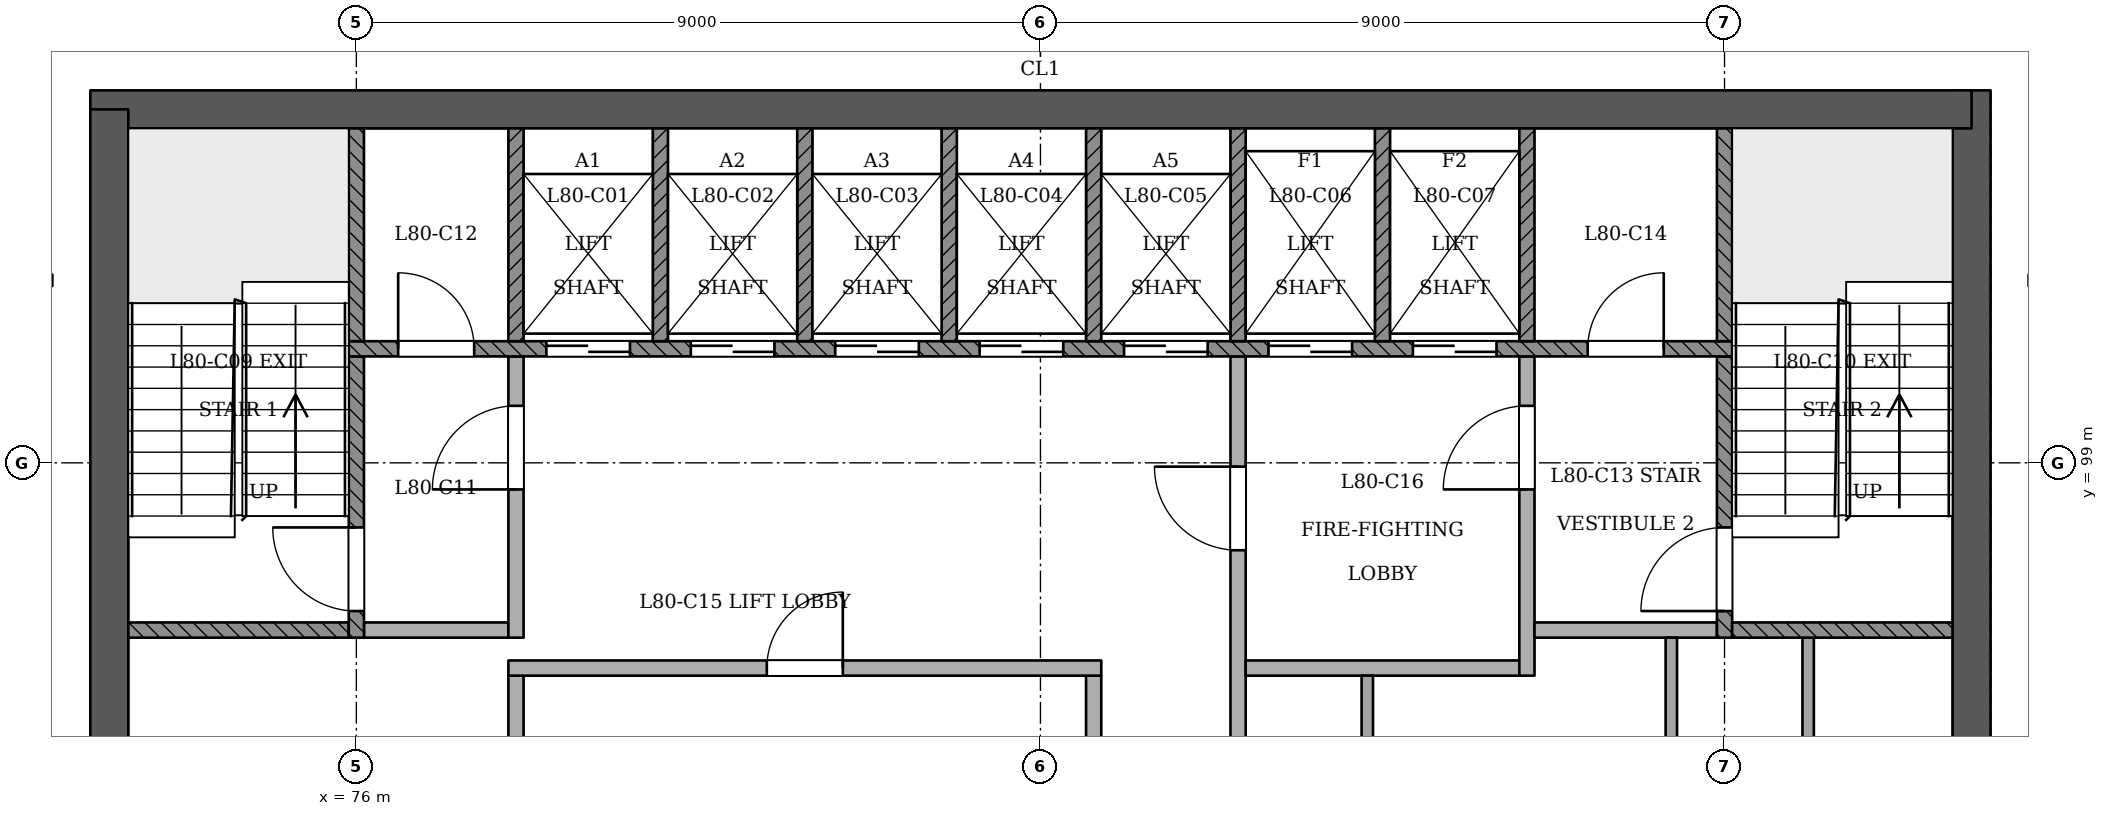
"""IFC4 building model, lengths in metres.
Left out: names, types, materials, properties, quantities, classifications, styles, units other than length and angle.
Written with IfcOpenShell. Run it as: python <this file> out.ifc"""

import sys

from ifc_helpers import new_model, si_unit, direction, frame, frame_2d, origin, place, context, subcontext, project, spatial, rectangle, extrude, element, fill, save


model = new_model("IFC4")
c1 = context("Model", 3, precision=1e-05, world=origin(), true_north=direction((0.0, 1.0)))
c2 = subcontext(c1, "Body", "Model", "MODEL_VIEW")
j1 = project(units=[si_unit("LENGTHUNIT", "METRE"), si_unit("PLANEANGLEUNIT", "RADIAN")], contexts=[c1])
p1 = place(None, origin())
s1 = spatial("IfcSite", under=j1, at=p1, CompositionType="ELEMENT")
p2 = place(p1, origin())
s2 = spatial("IfcBuilding", under=s1, at=p2, CompositionType="ELEMENT")
p3 = place(p2, frame((0.0, 0.0, 309.4)))
s3 = spatial("IfcBuildingStorey", under=s2, at=p3, CompositionType="ELEMENT", Elevation=309.4)
p4 = place(p3, frame((97.25, 93.15, 0.0), z_axis=(0.0, 0.0, 1.0), x_axis=(0.0, 1.0, 0.0)))
e1 = element("IfcWall", 1, at=p4, inside=s3, PredefinedType="SHEAR", context=c2, shape_type="SweptSolid", body=[
    extrude(rectangle(XDim=10.75, YDim=0.5, at=frame_2d((5.375, 0.0))), origin(), (0.0, 0.0, 1.0), 3.6),
])
p5 = place(p3, frame((97.25, 103.65, 0.0), z_axis=(0.0, 0.0, 1.0), x_axis=(-1.0, 0.0, 0.0)))
e2 = element("IfcWall", 2, at=p5, inside=s3, PredefinedType="SHEAR", context=c2, shape_type="SweptSolid", body=[
    extrude(rectangle(XDim=24.75, YDim=0.5, at=frame_2d((12.375, 0.0))), origin(), (0.0, 0.0, 1.0), 3.6),
])
p6 = place(p3, frame((72.75, 103.65, 0.0), z_axis=(0.0, 0.0, 1.0), x_axis=(0.0, -1.0, 0.0)))
e3 = element("IfcWall", 3, at=p6, inside=s3, PredefinedType="SHEAR", context=c2, shape_type="SweptSolid", body=[
    extrude(rectangle(XDim=10.75, YDim=0.5, at=frame_2d((5.375, 0.0))), origin(), (0.0, 0.0, 1.0), 3.6),
])
for number, where, z_axis, x_axis in (
    (4, (78.1, 93.4, 0.0), (0.0, 0.0, 1.0), (0.0, 1.0, 0.0)),
    (5, (85.7, 93.4, 0.0), (0.0, 0.0, 1.0), (0.0, 1.0, 0.0)),
):
    element("IfcWall", number, at=place(p3, frame(where, z_axis=z_axis, x_axis=x_axis)), inside=s3, PredefinedType="PARTITIONING", context=c2, shape_type="SweptSolid", body=[
        extrude(rectangle(XDim=2.8, YDim=0.2, at=frame_2d((1.4, 0.0))), origin(), (0.0, 0.0, 1.0), 3.2),
    ])
p7 = place(p3, frame((87.6, 93.4, 0.0), z_axis=(0.0, 0.0, 1.0), x_axis=(0.0, 1.0, 0.0)))
e6 = element("IfcWall", 6, at=p7, inside=s3, PredefinedType="PARTITIONING", context=c2, shape_type="SweptSolid", body=[
    extrude(rectangle(XDim=7.0, YDim=0.2, at=frame_2d((3.5, 0.0))), origin(), (0.0, 0.0, 1.0), 3.2),
])
p8 = place(p7, frame((4.45, 0.0, 0.0)))
e7 = element("IfcOpeningElement", 7, at=p8, cuts=e6, PredefinedType="OPENING", context=c2, shape_type="SweptSolid", body=[
    extrude(rectangle(XDim=1.1, YDim=2.1, at=frame_2d((0.55, 1.05))), frame((0.0, 0.11, 0.0), z_axis=(0.0, -1.0, 0.0), x_axis=(1.0, 0.0, 0.0)), (0.0, 0.0, 1.0), 0.221),
])
p9 = place(p3, frame((89.3, 93.4, 0.0), z_axis=(0.0, 0.0, 1.0), x_axis=(0.0, 1.0, 0.0)))
e8 = element("IfcWall", 8, at=p9, inside=s3, PredefinedType="PARTITIONING", context=c2, shape_type="SweptSolid", body=[
    extrude(rectangle(XDim=2.8, YDim=0.15, at=frame_2d((1.4, 0.0))), origin(), (0.0, 0.0, 1.0), 3.2),
])
for number, where, z_axis, x_axis in (
    (9, (93.3, 93.4, 0.0), (0.0, 0.0, 1.0), (0.0, 1.0, 0.0)),
    (10, (95.1, 93.4, 0.0), (0.0, 0.0, 1.0), (0.0, 1.0, 0.0)),
):
    element("IfcWall", number, at=place(p3, frame(where, z_axis=z_axis, x_axis=x_axis)), inside=s3, PredefinedType="PARTITIONING", context=c2, shape_type="SweptSolid", body=[
        extrude(rectangle(XDim=3.3, YDim=0.15, at=frame_2d((1.65, 0.0))), origin(), (0.0, 0.0, 1.0), 3.2),
    ])
p10 = place(p3, frame((78.0, 96.3, 0.0), z_axis=(0.0, 0.0, 1.0), x_axis=(1.0, 0.0, 0.0)))
e11 = element("IfcWall", 11, at=p10, inside=s3, PredefinedType="PARTITIONING", context=c2, shape_type="SweptSolid", body=[
    extrude(rectangle(XDim=7.8, YDim=0.2, at=frame_2d((3.9, 0.0))), origin(), (0.0, 0.0, 1.0), 3.2),
])
p11 = place(p10, frame((3.4, 0.0, 0.0)))
e12 = element("IfcOpeningElement", 12, at=p11, cuts=e11, PredefinedType="OPENING", context=c2, shape_type="SweptSolid", body=[
    extrude(rectangle(XDim=1.0, YDim=2.1, at=frame_2d((0.5, 1.05))), frame((0.0, 0.11, 0.0), z_axis=(0.0, -1.0, 0.0), x_axis=(1.0, 0.0, 0.0)), (0.0, 0.0, 1.0), 0.221),
])
p12 = place(p3, frame((87.7, 96.3, 0.0), z_axis=(0.0, 0.0, 1.0), x_axis=(1.0, 0.0, 0.0)))
e13 = element("IfcWall", 13, at=p12, inside=s3, PredefinedType="PARTITIONING", context=c2, shape_type="SweptSolid", body=[
    extrude(rectangle(XDim=3.6, YDim=0.2, at=frame_2d((1.8, 0.0))), origin(), (0.0, 0.0, 1.0), 3.2),
])
p13 = place(p3, frame((91.4, 96.2, 0.0), z_axis=(0.0, 0.0, 1.0), x_axis=(0.0, 1.0, 0.0)))
e14 = element("IfcWall", 14, at=p13, inside=s3, PredefinedType="PARTITIONING", context=c2, shape_type="SweptSolid", body=[
    extrude(rectangle(XDim=4.2, YDim=0.2, at=frame_2d((2.1, 0.0))), origin(), (0.0, 0.0, 1.0), 3.2),
])
p14 = place(p13, frame((2.45, 0.0, 0.0)))
e15 = element("IfcOpeningElement", 15, at=p14, cuts=e14, PredefinedType="OPENING", context=c2, shape_type="SweptSolid", body=[
    extrude(rectangle(XDim=1.1, YDim=2.1, at=frame_2d((0.55, 1.05))), frame((0.0, 0.11, 0.0), z_axis=(0.0, -1.0, 0.0), x_axis=(1.0, 0.0, 0.0)), (0.0, 0.0, 1.0), 0.221),
])
p15 = place(p3, frame((73.0, 96.8, 0.0), z_axis=(0.0, 0.0, 1.0), x_axis=(1.0, 0.0, 0.0)))
e16 = element("IfcWall", 16, at=p15, inside=s3, PredefinedType="SOLIDWALL", context=c2, shape_type="SweptSolid", body=[
    extrude(rectangle(XDim=2.9, YDim=0.2, at=frame_2d((1.45, 0.0))), origin(), (0.0, 0.0, 1.0), 3.2),
])
p16 = place(p3, frame((76.0, 96.7, 0.0), z_axis=(0.0, 0.0, 1.0), x_axis=(0.0, 1.0, 0.0)))
e17 = element("IfcWall", 17, at=p16, inside=s3, PredefinedType="SOLIDWALL", context=c2, shape_type="SweptSolid", body=[
    extrude(rectangle(XDim=3.7, YDim=0.2, at=frame_2d((1.85, 0.0))), origin(), (0.0, 0.0, 1.0), 3.2),
])
p17 = place(p16, frame((0.35, 0.0, 0.0)))
e18 = element("IfcOpeningElement", 18, at=p17, cuts=e17, PredefinedType="OPENING", context=c2, shape_type="SweptSolid", body=[
    extrude(rectangle(XDim=1.1, YDim=2.1, at=frame_2d((0.55, 1.05))), frame((0.0, 0.11, 0.0), z_axis=(0.0, -1.0, 0.0), x_axis=(1.0, 0.0, 0.0)), (0.0, 0.0, 1.0), 0.221),
])
p18 = place(p3, frame((76.1, 96.8, 0.0), z_axis=(0.0, 0.0, 1.0), x_axis=(1.0, 0.0, 0.0)))
e19 = element("IfcWall", 19, at=p18, inside=s3, PredefinedType="PARTITIONING", context=c2, shape_type="SweptSolid", body=[
    extrude(rectangle(XDim=1.9, YDim=0.2, at=frame_2d((0.95, 0.0))), origin(), (0.0, 0.0, 1.0), 3.2),
])
p19 = place(p3, frame((78.1, 96.7, 0.0), z_axis=(0.0, 0.0, 1.0), x_axis=(0.0, 1.0, 0.0)))
e20 = element("IfcWall", 20, at=p19, inside=s3, PredefinedType="PARTITIONING", context=c2, shape_type="SweptSolid", body=[
    extrude(rectangle(XDim=3.7, YDim=0.2, at=frame_2d((1.85, 0.0))), origin(), (0.0, 0.0, 1.0), 3.2),
])
p20 = place(p19, frame((1.95, 0.0, 0.0)))
e21 = element("IfcOpeningElement", 21, at=p20, cuts=e20, PredefinedType="OPENING", context=c2, shape_type="SweptSolid", body=[
    extrude(rectangle(XDim=1.1, YDim=2.1, at=frame_2d((0.55, 1.05))), frame((0.0, 0.11, 0.0), z_axis=(0.0, -1.0, 0.0), x_axis=(1.0, 0.0, 0.0)), (0.0, 0.0, 1.0), 0.221),
])
p21 = place(p3, frame((91.5, 96.8, 0.0), z_axis=(0.0, 0.0, 1.0), x_axis=(1.0, 0.0, 0.0)))
e22 = element("IfcWall", 22, at=p21, inside=s3, PredefinedType="PARTITIONING", context=c2, shape_type="SweptSolid", body=[
    extrude(rectangle(XDim=2.4, YDim=0.2, at=frame_2d((1.2, 0.0))), origin(), (0.0, 0.0, 1.0), 3.2),
])
p22 = place(p3, frame((94.0, 96.7, 0.0), z_axis=(0.0, 0.0, 1.0), x_axis=(0.0, 1.0, 0.0)))
e23 = element("IfcWall", 23, at=p22, inside=s3, PredefinedType="SOLIDWALL", context=c2, shape_type="SweptSolid", body=[
    extrude(rectangle(XDim=3.7, YDim=0.2, at=frame_2d((1.85, 0.0))), origin(), (0.0, 0.0, 1.0), 3.2),
])
p23 = place(p22, frame((0.35, 0.0, 0.0)))
e24 = element("IfcOpeningElement", 24, at=p23, cuts=e23, PredefinedType="OPENING", context=c2, shape_type="SweptSolid", body=[
    extrude(rectangle(XDim=1.1, YDim=2.1, at=frame_2d((0.55, 1.05))), frame((0.0, 0.11, 0.0), z_axis=(0.0, -1.0, 0.0), x_axis=(1.0, 0.0, 0.0)), (0.0, 0.0, 1.0), 0.221),
])
p24 = place(p3, frame((94.1, 96.8, 0.0), z_axis=(0.0, 0.0, 1.0), x_axis=(1.0, 0.0, 0.0)))
e25 = element("IfcWall", 25, at=p24, inside=s3, PredefinedType="SOLIDWALL", context=c2, shape_type="SweptSolid", body=[
    extrude(rectangle(XDim=2.9, YDim=0.2, at=frame_2d((1.45, 0.0))), origin(), (0.0, 0.0, 1.0), 3.2),
])
p25 = place(p3, frame((75.9, 100.5, 0.0), z_axis=(0.0, 0.0, 1.0), x_axis=(1.0, 0.0, 0.0)))
e26 = element("IfcWall", 26, at=p25, inside=s3, PredefinedType="SOLIDWALL", context=c2, shape_type="SweptSolid", body=[
    extrude(rectangle(XDim=18.2, YDim=0.2, at=frame_2d((9.1, 0.0))), origin(), (0.0, 0.0, 1.0), 3.2),
])
p26 = place(p25, frame((2.6, 0.0, 0.0)))
e27 = element("IfcOpeningElement", 27, at=p26, cuts=e26, PredefinedType="OPENING", context=c2, shape_type="SweptSolid", body=[
    extrude(rectangle(XDim=1.1, YDim=2.1, at=frame_2d((0.55, 1.05))), frame((0.0, 0.11, 0.0), z_axis=(0.0, -1.0, 0.0), x_axis=(1.0, 0.0, 0.0)), (0.0, 0.0, 1.0), 0.221),
])
p27 = place(p25, frame((4.5, 0.0, 0.0)))
e28 = element("IfcOpeningElement", 28, at=p27, cuts=e26, PredefinedType="OPENING", context=c2, shape_type="SweptSolid", body=[
    extrude(rectangle(XDim=1.1, YDim=2.1, at=frame_2d((0.55, 1.05))), frame((0.0, 0.11, 0.0), z_axis=(0.0, -1.0, 0.0), x_axis=(1.0, 0.0, 0.0)), (0.0, 0.0, 1.0), 0.221),
])
p28 = place(p25, frame((6.4, 0.0, 0.0)))
e29 = element("IfcOpeningElement", 29, at=p28, cuts=e26, PredefinedType="OPENING", context=c2, shape_type="SweptSolid", body=[
    extrude(rectangle(XDim=1.1, YDim=2.1, at=frame_2d((0.55, 1.05))), frame((0.0, 0.11, 0.0), z_axis=(0.0, -1.0, 0.0), x_axis=(1.0, 0.0, 0.0)), (0.0, 0.0, 1.0), 0.221),
])
p29 = place(p25, frame((8.3, 0.0, 0.0)))
e30 = element("IfcOpeningElement", 30, at=p29, cuts=e26, PredefinedType="OPENING", context=c2, shape_type="SweptSolid", body=[
    extrude(rectangle(XDim=1.1, YDim=2.1, at=frame_2d((0.55, 1.05))), frame((0.0, 0.11, 0.0), z_axis=(0.0, -1.0, 0.0), x_axis=(1.0, 0.0, 0.0)), (0.0, 0.0, 1.0), 0.221),
])
p30 = place(p25, frame((10.2, 0.0, 0.0)))
e31 = element("IfcOpeningElement", 31, at=p30, cuts=e26, PredefinedType="OPENING", context=c2, shape_type="SweptSolid", body=[
    extrude(rectangle(XDim=1.1, YDim=2.1, at=frame_2d((0.55, 1.05))), frame((0.0, 0.11, 0.0), z_axis=(0.0, -1.0, 0.0), x_axis=(1.0, 0.0, 0.0)), (0.0, 0.0, 1.0), 0.221),
])
p31 = place(p25, frame((12.1, 0.0, 0.0)))
e32 = element("IfcOpeningElement", 32, at=p31, cuts=e26, PredefinedType="OPENING", context=c2, shape_type="SweptSolid", body=[
    extrude(rectangle(XDim=1.1, YDim=2.1, at=frame_2d((0.55, 1.05))), frame((0.0, 0.11, 0.0), z_axis=(0.0, -1.0, 0.0), x_axis=(1.0, 0.0, 0.0)), (0.0, 0.0, 1.0), 0.221),
])
p32 = place(p25, frame((14.0, 0.0, 0.0)))
e33 = element("IfcOpeningElement", 33, at=p32, cuts=e26, PredefinedType="OPENING", context=c2, shape_type="SweptSolid", body=[
    extrude(rectangle(XDim=1.1, YDim=2.1, at=frame_2d((0.55, 1.05))), frame((0.0, 0.11, 0.0), z_axis=(0.0, -1.0, 0.0), x_axis=(1.0, 0.0, 0.0)), (0.0, 0.0, 1.0), 0.221),
])
p33 = place(p25, frame((0.65, 0.0, 0.0)))
e34 = element("IfcOpeningElement", 34, at=p33, cuts=e26, PredefinedType="OPENING", context=c2, shape_type="SweptSolid", body=[
    extrude(rectangle(XDim=1.0, YDim=2.1, at=frame_2d((0.5, 1.05))), frame((0.0, 0.11, 0.0), z_axis=(0.0, -1.0, 0.0), x_axis=(1.0, 0.0, 0.0)), (0.0, 0.0, 1.0), 0.221),
])
p34 = place(p25, frame((16.3, 0.0, 0.0)))
e35 = element("IfcOpeningElement", 35, at=p34, cuts=e26, PredefinedType="OPENING", context=c2, shape_type="SweptSolid", body=[
    extrude(rectangle(XDim=1.0, YDim=2.1, at=frame_2d((0.5, 1.05))), frame((0.0, 0.11, 0.0), z_axis=(0.0, -1.0, 0.0), x_axis=(1.0, 0.0, 0.0)), (0.0, 0.0, 1.0), 0.221),
])
for number, where, z_axis, x_axis in (
    (36, (76.0, 100.6, 0.0), (0.0, 0.0, 1.0), (0.0, 1.0, 0.0)),
    (37, (78.1, 100.6, 0.0), (0.0, 0.0, 1.0), (0.0, 1.0, 0.0)),
    (38, (80.0, 100.6, 0.0), (0.0, 0.0, 1.0), (0.0, 1.0, 0.0)),
    (39, (81.9, 100.6, 0.0), (0.0, 0.0, 1.0), (0.0, 1.0, 0.0)),
    (40, (83.8, 100.6, 0.0), (0.0, 0.0, 1.0), (0.0, 1.0, 0.0)),
    (41, (85.7, 100.6, 0.0), (0.0, 0.0, 1.0), (0.0, 1.0, 0.0)),
    (42, (87.6, 100.6, 0.0), (0.0, 0.0, 1.0), (0.0, 1.0, 0.0)),
    (43, (89.5, 100.6, 0.0), (0.0, 0.0, 1.0), (0.0, 1.0, 0.0)),
    (44, (91.4, 100.6, 0.0), (0.0, 0.0, 1.0), (0.0, 1.0, 0.0)),
    (45, (94.0, 100.6, 0.0), (0.0, 0.0, 1.0), (0.0, 1.0, 0.0)),
):
    element("IfcWall", number, at=place(p3, frame(where, z_axis=z_axis, x_axis=x_axis)), inside=s3, PredefinedType="SOLIDWALL", context=c2, shape_type="SweptSolid", body=[
        extrude(rectangle(XDim=2.8, YDim=0.2, at=frame_2d((1.4, 0.0))), origin(), (0.0, 0.0, 1.0), 3.2),
    ])
p35 = place(p26, origin())
e46 = element("IfcDoor", 46, at=p35, inside=s3, OperationType="SLIDING_TO_RIGHT", PredefinedType="NOTDEFINED", context=c2, shape_type="SweptSolid", body=[
    extrude(rectangle(XDim=1.1, YDim=2.1, at=frame_2d((0.55, 1.05))), frame((0.0, 0.025, 0.0), z_axis=(0.0, -1.0, 0.0), x_axis=(1.0, 0.0, 0.0)), (0.0, 0.0, 1.0), 0.05),
])
fill(e27, e46)
p36 = place(p27, origin())
e47 = element("IfcDoor", 47, at=p36, inside=s3, OperationType="SLIDING_TO_LEFT", PredefinedType="NOTDEFINED", context=c2, shape_type="SweptSolid", body=[
    extrude(rectangle(XDim=1.1, YDim=2.1, at=frame_2d((0.55, 1.05))), frame((0.0, 0.025, 0.0), z_axis=(0.0, -1.0, 0.0), x_axis=(1.0, 0.0, 0.0)), (0.0, 0.0, 1.0), 0.05),
])
fill(e28, e47)
p37 = place(p28, origin())
e48 = element("IfcDoor", 48, at=p37, inside=s3, OperationType="SLIDING_TO_RIGHT", PredefinedType="NOTDEFINED", context=c2, shape_type="SweptSolid", body=[
    extrude(rectangle(XDim=1.1, YDim=2.1, at=frame_2d((0.55, 1.05))), frame((0.0, 0.025, 0.0), z_axis=(0.0, -1.0, 0.0), x_axis=(1.0, 0.0, 0.0)), (0.0, 0.0, 1.0), 0.05),
])
fill(e29, e48)
p38 = place(p29, origin())
e49 = element("IfcDoor", 49, at=p38, inside=s3, OperationType="SLIDING_TO_LEFT", PredefinedType="NOTDEFINED", context=c2, shape_type="SweptSolid", body=[
    extrude(rectangle(XDim=1.1, YDim=2.1, at=frame_2d((0.55, 1.05))), frame((0.0, 0.025, 0.0), z_axis=(0.0, -1.0, 0.0), x_axis=(1.0, 0.0, 0.0)), (0.0, 0.0, 1.0), 0.05),
])
fill(e30, e49)
p39 = place(p30, origin())
e50 = element("IfcDoor", 50, at=p39, inside=s3, OperationType="SLIDING_TO_RIGHT", PredefinedType="NOTDEFINED", context=c2, shape_type="SweptSolid", body=[
    extrude(rectangle(XDim=1.1, YDim=2.1, at=frame_2d((0.55, 1.05))), frame((0.0, 0.025, 0.0), z_axis=(0.0, -1.0, 0.0), x_axis=(1.0, 0.0, 0.0)), (0.0, 0.0, 1.0), 0.05),
])
fill(e31, e50)
p40 = place(p31, origin())
e51 = element("IfcDoor", 51, at=p40, inside=s3, OperationType="SLIDING_TO_RIGHT", PredefinedType="NOTDEFINED", context=c2, shape_type="SweptSolid", body=[
    extrude(rectangle(XDim=1.1, YDim=2.1, at=frame_2d((0.55, 1.05))), frame((0.0, 0.025, 0.0), z_axis=(0.0, -1.0, 0.0), x_axis=(1.0, 0.0, 0.0)), (0.0, 0.0, 1.0), 0.05),
])
fill(e32, e51)
p41 = place(p32, origin())
e52 = element("IfcDoor", 52, at=p41, inside=s3, OperationType="SLIDING_TO_LEFT", PredefinedType="NOTDEFINED", context=c2, shape_type="SweptSolid", body=[
    extrude(rectangle(XDim=1.1, YDim=2.1, at=frame_2d((0.55, 1.05))), frame((0.0, 0.025, 0.0), z_axis=(0.0, -1.0, 0.0), x_axis=(1.0, 0.0, 0.0)), (0.0, 0.0, 1.0), 0.05),
])
fill(e33, e52)
p42 = place(p17, origin())
e53 = element("IfcDoor", 53, at=p42, inside=s3, OperationType="SINGLE_SWING_RIGHT", PredefinedType="NOTDEFINED", context=c2, shape_type="SweptSolid", body=[
    extrude(rectangle(XDim=1.1, YDim=2.1, at=frame_2d((0.55, 1.05))), frame((0.0, 0.025, 0.0), z_axis=(0.0, -1.0, 0.0), x_axis=(1.0, 0.0, 0.0)), (0.0, 0.0, 1.0), 0.05),
])
fill(e18, e53)
p43 = place(p23, origin())
e54 = element("IfcDoor", 54, at=p43, inside=s3, OperationType="SINGLE_SWING_LEFT", PredefinedType="NOTDEFINED", context=c2, shape_type="SweptSolid", body=[
    extrude(rectangle(XDim=1.1, YDim=2.1, at=frame_2d((0.55, 1.05))), frame((0.0, 0.025, 0.0), z_axis=(0.0, -1.0, 0.0), x_axis=(1.0, 0.0, 0.0)), (0.0, 0.0, 1.0), 0.05),
])
fill(e24, e54)
p44 = place(p20, origin())
e55 = element("IfcDoor", 55, at=p44, inside=s3, OperationType="SINGLE_SWING_LEFT", PredefinedType="NOTDEFINED", context=c2, shape_type="SweptSolid", body=[
    extrude(rectangle(XDim=1.1, YDim=2.1, at=frame_2d((0.55, 1.05))), frame((0.0, 0.025, 0.0), z_axis=(0.0, -1.0, 0.0), x_axis=(1.0, 0.0, 0.0)), (0.0, 0.0, 1.0), 0.05),
])
fill(e21, e55)
p45 = place(p8, origin())
e56 = element("IfcDoor", 56, at=p45, inside=s3, OperationType="SINGLE_SWING_RIGHT", PredefinedType="NOTDEFINED", context=c2, shape_type="SweptSolid", body=[
    extrude(rectangle(XDim=1.1, YDim=2.1, at=frame_2d((0.55, 1.05))), frame((0.0, 0.025, 0.0), z_axis=(0.0, -1.0, 0.0), x_axis=(1.0, 0.0, 0.0)), (0.0, 0.0, 1.0), 0.05),
])
fill(e7, e56)
p46 = place(p14, origin())
e57 = element("IfcDoor", 57, at=p46, inside=s3, OperationType="SINGLE_SWING_LEFT", PredefinedType="NOTDEFINED", context=c2, shape_type="SweptSolid", body=[
    extrude(rectangle(XDim=1.1, YDim=2.1, at=frame_2d((0.55, 1.05))), frame((0.0, 0.025, 0.0), z_axis=(0.0, -1.0, 0.0), x_axis=(1.0, 0.0, 0.0)), (0.0, 0.0, 1.0), 0.05),
])
fill(e15, e57)
p47 = place(p33, origin())
e58 = element("IfcDoor", 58, at=p47, inside=s3, OperationType="SINGLE_SWING_LEFT", PredefinedType="NOTDEFINED", context=c2, shape_type="SweptSolid", body=[
    extrude(rectangle(XDim=1.0, YDim=2.1, at=frame_2d((0.5, 1.05))), frame((0.0, 0.025, 0.0), z_axis=(0.0, -1.0, 0.0), x_axis=(1.0, 0.0, 0.0)), (0.0, 0.0, 1.0), 0.05),
])
fill(e34, e58)
p48 = place(p34, origin())
e59 = element("IfcDoor", 59, at=p48, inside=s3, OperationType="SINGLE_SWING_RIGHT", PredefinedType="NOTDEFINED", context=c2, shape_type="SweptSolid", body=[
    extrude(rectangle(XDim=1.0, YDim=2.1, at=frame_2d((0.5, 1.05))), frame((0.0, 0.025, 0.0), z_axis=(0.0, -1.0, 0.0), x_axis=(1.0, 0.0, 0.0)), (0.0, 0.0, 1.0), 0.05),
])
fill(e35, e59)
p49 = place(p11, origin())
e60 = element("IfcDoor", 60, at=p49, inside=s3, OperationType="SINGLE_SWING_RIGHT", PredefinedType="NOTDEFINED", context=c2, shape_type="SweptSolid", body=[
    extrude(rectangle(XDim=1.0, YDim=2.1, at=frame_2d((0.5, 1.05))), frame((0.0, 0.025, 0.0), z_axis=(0.0, -1.0, 0.0), x_axis=(1.0, 0.0, 0.0)), (0.0, 0.0, 1.0), 0.05),
])
fill(e12, e60)
save(model, sys.argv[1])
